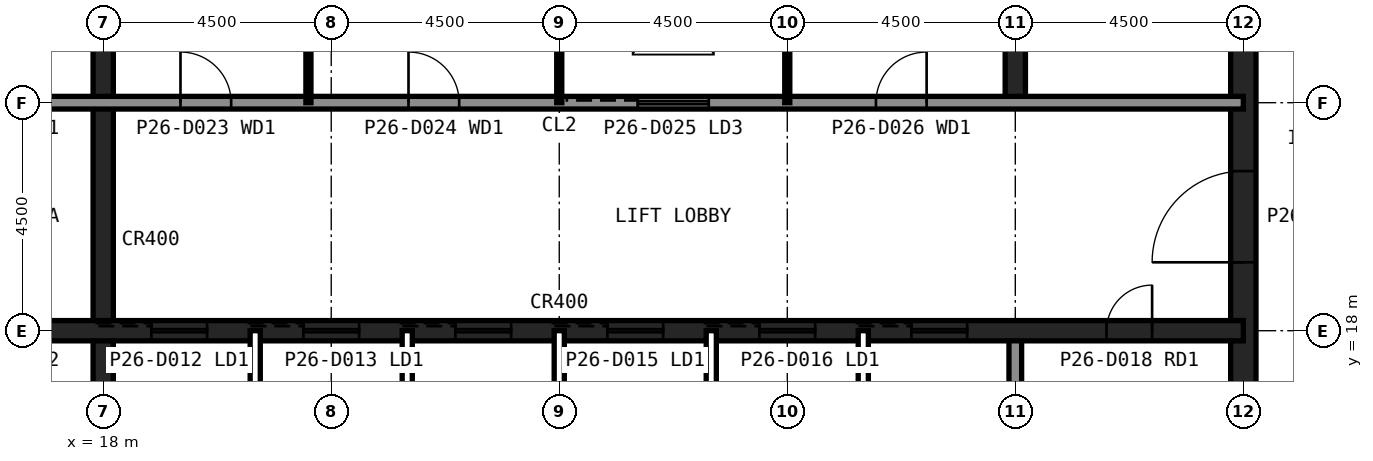
"""IFC4 building model, lengths in metres.
Left out: names, types, materials, properties, quantities, classifications, styles, units other than length and angle.
Written with IfcOpenShell. Run it as: python <this file> out.ifc"""

import sys

from ifc_helpers import new_model, si_unit, direction, frame, frame_2d, origin, place, context, subcontext, project, spatial, rectangle, extrude, element, fill, save


model = new_model("IFC4")
c1 = context("Model", 3, precision=1e-05, world=origin(), true_north=direction((0.0, 1.0)))
c2 = subcontext(c1, "Body", "Model", "MODEL_VIEW")
j1 = project(units=[si_unit("LENGTHUNIT", "METRE"), si_unit("PLANEANGLEUNIT", "RADIAN")], contexts=[c1])
p1 = place(None, origin())
s1 = spatial("IfcSite", under=j1, at=p1, CompositionType="ELEMENT")
p2 = place(p1, origin())
s2 = spatial("IfcBuilding", under=s1, at=p2, CompositionType="ELEMENT")
p3 = place(p2, frame((0.0, 0.0, 115.6)))
s3 = spatial("IfcBuildingStorey", under=s2, at=p3, CompositionType="ELEMENT", Elevation=115.6)
p4 = place(p3, frame((40.5, 13.5, 0.0), z_axis=(0.0, 0.0, 1.0), x_axis=(0.0, 1.0, 0.0)))
e1 = element("IfcWall", 1, at=p4, inside=s3, PredefinedType="SHEAR", context=c2, shape_type="SweptSolid", body=[
    extrude(rectangle(XDim=27.0, YDim=0.5, at=frame_2d((13.5, 0.0))), origin(), (0.0, 0.0, 1.0), 4.0),
])
p5 = place(p4, frame((5.85, 0.0, 0.0)))
e2 = element("IfcOpeningElement", 2, at=p5, cuts=e1, PredefinedType="OPENING", context=c2, shape_type="SweptSolid", body=[
    extrude(rectangle(XDim=1.8, YDim=2.1, at=frame_2d((0.9, 1.05))), frame((0.0, 0.26, 0.0), z_axis=(0.0, -1.0, 0.0), x_axis=(1.0, 0.0, 0.0)), (0.0, 0.0, 1.0), 0.52),
])
p6 = place(p4, frame((19.65, 0.0, 0.0)))
e3 = element("IfcOpeningElement", 3, at=p6, cuts=e1, PredefinedType="OPENING", context=c2, shape_type="SweptSolid", body=[
    extrude(rectangle(XDim=1.2, YDim=2.1, at=frame_2d((0.6, 1.05))), frame((0.0, 0.26, 0.0), z_axis=(0.0, -1.0, 0.0), x_axis=(1.0, 0.0, 0.0)), (0.0, 0.0, 1.0), 0.52),
])
p7 = place(p3, frame((18.0, 13.5, 0.0), z_axis=(0.0, 0.0, 1.0), x_axis=(0.0, 1.0, 0.0)))
e4 = element("IfcWall", 4, at=p7, inside=s3, PredefinedType="SHEAR", context=c2, shape_type="SweptSolid", body=[
    extrude(rectangle(XDim=18.0, YDim=0.4, at=frame_2d((9.0, 0.0))), origin(), (0.0, 0.0, 1.0), 4.0),
])
p8 = place(p3, frame((36.0, 13.5, 0.0), z_axis=(0.0, 0.0, 1.0), x_axis=(0.0, 1.0, 0.0)))
e5 = element("IfcWall", 5, at=p8, inside=s3, PredefinedType="SOLIDWALL", context=c2, shape_type="SweptSolid", body=[
    extrude(rectangle(XDim=4.5, YDim=0.25, at=frame_2d((2.25, 0.0))), origin(), (0.0, 0.0, 1.0), 3.84),
])
p9 = place(p3, frame((36.0, 22.5, 0.0), z_axis=(0.0, 0.0, 1.0), x_axis=(0.0, 1.0, 0.0)))
e6 = element("IfcWall", 6, at=p9, inside=s3, PredefinedType="SHEAR", context=c2, shape_type="SweptSolid", body=[
    extrude(rectangle(XDim=18.0, YDim=0.4, at=frame_2d((9.0, 0.0))), origin(), (0.0, 0.0, 1.0), 4.0),
])
p10 = place(p3, frame((13.5, 18.0, 0.0), z_axis=(0.0, 0.0, 1.0), x_axis=(1.0, 0.0, 0.0)))
e7 = element("IfcWall", 7, at=p10, inside=s3, PredefinedType="SHEAR", context=c2, shape_type="SweptSolid", body=[
    extrude(rectangle(XDim=27.0, YDim=0.4, at=frame_2d((13.5, 0.0))), origin(), (0.0, 0.0, 1.0), 4.0),
])
p11 = place(p10, frame((24.3, 0.0, 0.0)))
e8 = element("IfcOpeningElement", 8, at=p11, cuts=e7, PredefinedType="OPENING", context=c2, shape_type="SweptSolid", body=[
    extrude(rectangle(XDim=0.9, YDim=2.1, at=frame_2d((0.45, 1.05))), frame((0.0, 0.21, 0.0), z_axis=(0.0, -1.0, 0.0), x_axis=(1.0, 0.0, 0.0)), (0.0, 0.0, 1.0), 0.42),
])
p12 = place(p10, frame((5.45, 0.0, 0.0)))
e9 = element("IfcOpeningElement", 9, at=p12, cuts=e7, PredefinedType="OPENING", context=c2, shape_type="SweptSolid", body=[
    extrude(rectangle(XDim=1.1, YDim=2.1, at=frame_2d((0.55, 1.05))), frame((0.0, 0.21, 0.0), z_axis=(0.0, -1.0, 0.0), x_axis=(1.0, 0.0, 0.0)), (0.0, 0.0, 1.0), 0.42),
])
p13 = place(p10, frame((8.45, 0.0, 0.0)))
e10 = element("IfcOpeningElement", 10, at=p13, cuts=e7, PredefinedType="OPENING", context=c2, shape_type="SweptSolid", body=[
    extrude(rectangle(XDim=1.1, YDim=2.1, at=frame_2d((0.55, 1.05))), frame((0.0, 0.21, 0.0), z_axis=(0.0, -1.0, 0.0), x_axis=(1.0, 0.0, 0.0)), (0.0, 0.0, 1.0), 0.42),
])
p14 = place(p10, frame((11.45, 0.0, 0.0)))
e11 = element("IfcOpeningElement", 11, at=p14, cuts=e7, PredefinedType="OPENING", context=c2, shape_type="SweptSolid", body=[
    extrude(rectangle(XDim=1.1, YDim=2.1, at=frame_2d((0.55, 1.05))), frame((0.0, 0.21, 0.0), z_axis=(0.0, -1.0, 0.0), x_axis=(1.0, 0.0, 0.0)), (0.0, 0.0, 1.0), 0.42),
])
p15 = place(p10, frame((14.45, 0.0, 0.0)))
e12 = element("IfcOpeningElement", 12, at=p15, cuts=e7, PredefinedType="OPENING", context=c2, shape_type="SweptSolid", body=[
    extrude(rectangle(XDim=1.1, YDim=2.1, at=frame_2d((0.55, 1.05))), frame((0.0, 0.21, 0.0), z_axis=(0.0, -1.0, 0.0), x_axis=(1.0, 0.0, 0.0)), (0.0, 0.0, 1.0), 0.42),
])
p16 = place(p10, frame((17.45, 0.0, 0.0)))
e13 = element("IfcOpeningElement", 13, at=p16, cuts=e7, PredefinedType="OPENING", context=c2, shape_type="SweptSolid", body=[
    extrude(rectangle(XDim=1.1, YDim=2.1, at=frame_2d((0.55, 1.05))), frame((0.0, 0.21, 0.0), z_axis=(0.0, -1.0, 0.0), x_axis=(1.0, 0.0, 0.0)), (0.0, 0.0, 1.0), 0.42),
])
p17 = place(p10, frame((20.45, 0.0, 0.0)))
e14 = element("IfcOpeningElement", 14, at=p17, cuts=e7, PredefinedType="OPENING", context=c2, shape_type="SweptSolid", body=[
    extrude(rectangle(XDim=1.1, YDim=2.1, at=frame_2d((0.55, 1.05))), frame((0.0, 0.21, 0.0), z_axis=(0.0, -1.0, 0.0), x_axis=(1.0, 0.0, 0.0)), (0.0, 0.0, 1.0), 0.42),
])
p18 = place(p10, frame((1.6, 0.0, 0.0)))
e15 = element("IfcOpeningElement", 15, at=p18, cuts=e7, PredefinedType="OPENING", context=c2, shape_type="SweptSolid", body=[
    extrude(rectangle(XDim=1.3, YDim=2.2, at=frame_2d((0.65, 1.1))), frame((0.0, 0.21, 0.0), z_axis=(0.0, -1.0, 0.0), x_axis=(1.0, 0.0, 0.0)), (0.0, 0.0, 1.0), 0.42),
])
p19 = place(p3, frame((13.5, 22.5, 0.0), z_axis=(0.0, 0.0, 1.0), x_axis=(1.0, 0.0, 0.0)))
e16 = element("IfcWall", 16, at=p19, inside=s3, PredefinedType="SOLIDWALL", context=c2, shape_type="SweptSolid", body=[
    extrude(rectangle(XDim=27.0, YDim=0.25, at=frame_2d((13.5, 0.0))), origin(), (0.0, 0.0, 1.0), 3.84),
])
p20 = place(p19, frame((1.65, 0.0, 0.0)))
e17 = element("IfcOpeningElement", 17, at=p20, cuts=e16, PredefinedType="OPENING", context=c2, shape_type="SweptSolid", body=[
    extrude(rectangle(XDim=1.2, YDim=2.1, at=frame_2d((0.6, 1.05))), frame((0.0, 0.135, 0.0), z_axis=(0.0, -1.0, 0.0), x_axis=(1.0, 0.0, 0.0)), (0.0, 0.0, 1.0), 0.27),
])
p21 = place(p19, frame((6.025, 0.0, 0.0)))
e18 = element("IfcOpeningElement", 18, at=p21, cuts=e16, PredefinedType="OPENING", context=c2, shape_type="SweptSolid", body=[
    extrude(rectangle(XDim=1.0, YDim=2.1, at=frame_2d((0.5, 1.05))), frame((0.0, 0.135, 0.0), z_axis=(0.0, -1.0, 0.0), x_axis=(1.0, 0.0, 0.0)), (0.0, 0.0, 1.0), 0.27),
])
p22 = place(p19, frame((10.525, 0.0, 0.0)))
e19 = element("IfcOpeningElement", 19, at=p22, cuts=e16, PredefinedType="OPENING", context=c2, shape_type="SweptSolid", body=[
    extrude(rectangle(XDim=1.0, YDim=2.1, at=frame_2d((0.5, 1.05))), frame((0.0, 0.135, 0.0), z_axis=(0.0, -1.0, 0.0), x_axis=(1.0, 0.0, 0.0)), (0.0, 0.0, 1.0), 0.27),
])
p23 = place(p19, frame((19.75, 0.0, 0.0)))
e20 = element("IfcOpeningElement", 20, at=p23, cuts=e16, PredefinedType="OPENING", context=c2, shape_type="SweptSolid", body=[
    extrude(rectangle(XDim=1.0, YDim=2.1, at=frame_2d((0.5, 1.05))), frame((0.0, 0.135, 0.0), z_axis=(0.0, -1.0, 0.0), x_axis=(1.0, 0.0, 0.0)), (0.0, 0.0, 1.0), 0.27),
])
p24 = place(p19, frame((15.05, 0.0, 0.0)))
e21 = element("IfcOpeningElement", 21, at=p24, cuts=e16, PredefinedType="OPENING", context=c2, shape_type="SweptSolid", body=[
    extrude(rectangle(XDim=1.4, YDim=2.4, at=frame_2d((0.7, 1.2))), frame((0.0, 0.135, 0.0), z_axis=(0.0, -1.0, 0.0), x_axis=(1.0, 0.0, 0.0)), (0.0, 0.0, 1.0), 0.27),
])
for number, where, z_axis, x_axis in (
    (22, (21.0, 13.5, 0.0), (0.0, 0.0, 1.0), (0.0, 1.0, 0.0)),
    (23, (24.0, 13.5, 0.0), (0.0, 0.0, 1.0), (0.0, 1.0, 0.0)),
    (24, (27.0, 13.5, 0.0), (0.0, 0.0, 1.0), (0.0, 1.0, 0.0)),
    (25, (30.0, 13.5, 0.0), (0.0, 0.0, 1.0), (0.0, 1.0, 0.0)),
    (26, (33.0, 13.5, 0.0), (0.0, 0.0, 1.0), (0.0, 1.0, 0.0)),
):
    element("IfcWall", number, at=place(p3, frame(where, z_axis=z_axis, x_axis=x_axis)), inside=s3, PredefinedType="PARTITIONING", context=c2, shape_type="SweptSolid", body=[
        extrude(rectangle(XDim=4.5, YDim=0.2, at=frame_2d((2.25, 0.0))), origin(), (0.0, 0.0, 1.0), 3.84),
    ])
for number, where, z_axis, x_axis in (
    (27, (22.05, 22.5, 0.0), (0.0, 0.0, 1.0), (0.0, 1.0, 0.0)),
    (28, (27.0, 22.5, 0.0), (0.0, 0.0, 1.0), (0.0, 1.0, 0.0)),
    (29, (31.5, 22.5, 0.0), (0.0, 0.0, 1.0), (0.0, 1.0, 0.0)),
):
    element("IfcWall", number, at=place(p3, frame(where, z_axis=z_axis, x_axis=x_axis)), inside=s3, PredefinedType="PLUMBINGWALL", context=c2, shape_type="SweptSolid", body=[
        extrude(rectangle(XDim=9.0, YDim=0.1, at=frame_2d((4.5, 0.0))), origin(), (0.0, 0.0, 1.0), 3.84),
    ])
p25 = place(p5, origin())
e30 = element("IfcDoor", 30, at=p25, inside=s3, OperationType="SINGLE_SWING_LEFT", PredefinedType="DOOR", context=c2, shape_type="SweptSolid", body=[
    extrude(rectangle(XDim=1.8, YDim=2.1, at=frame_2d((0.9, 1.05))), frame((0.0, 0.025, 0.0), z_axis=(0.0, -1.0, 0.0), x_axis=(1.0, 0.0, 0.0)), (0.0, 0.0, 1.0), 0.05),
])
fill(e2, e30)
p26 = place(p21, origin())
e31 = element("IfcDoor", 31, at=p26, inside=s3, OperationType="SINGLE_SWING_LEFT", PredefinedType="DOOR", context=c2, shape_type="SweptSolid", body=[
    extrude(rectangle(XDim=1.0, YDim=2.1, at=frame_2d((0.5, 1.05))), frame((0.0, 0.025, 0.0), z_axis=(0.0, -1.0, 0.0), x_axis=(1.0, 0.0, 0.0)), (0.0, 0.0, 1.0), 0.05),
])
fill(e18, e31)
p27 = place(p22, origin())
e32 = element("IfcDoor", 32, at=p27, inside=s3, OperationType="SINGLE_SWING_LEFT", PredefinedType="DOOR", context=c2, shape_type="SweptSolid", body=[
    extrude(rectangle(XDim=1.0, YDim=2.1, at=frame_2d((0.5, 1.05))), frame((0.0, 0.025, 0.0), z_axis=(0.0, -1.0, 0.0), x_axis=(1.0, 0.0, 0.0)), (0.0, 0.0, 1.0), 0.05),
])
fill(e19, e32)
p28 = place(p23, origin())
e33 = element("IfcDoor", 33, at=p28, inside=s3, OperationType="SINGLE_SWING_RIGHT", PredefinedType="DOOR", context=c2, shape_type="SweptSolid", body=[
    extrude(rectangle(XDim=1.0, YDim=2.1, at=frame_2d((0.5, 1.05))), frame((0.0, 0.025, 0.0), z_axis=(0.0, -1.0, 0.0), x_axis=(1.0, 0.0, 0.0)), (0.0, 0.0, 1.0), 0.05),
])
fill(e20, e33)
p29 = place(p11, origin())
e34 = element("IfcDoor", 34, at=p29, inside=s3, OperationType="SINGLE_SWING_RIGHT", PredefinedType="DOOR", context=c2, shape_type="SweptSolid", body=[
    extrude(rectangle(XDim=0.9, YDim=2.1, at=frame_2d((0.45, 1.05))), frame((0.0, 0.025, 0.0), z_axis=(0.0, -1.0, 0.0), x_axis=(1.0, 0.0, 0.0)), (0.0, 0.0, 1.0), 0.05),
])
fill(e8, e34)
p30 = place(p12, origin())
e35 = element("IfcDoor", 35, at=p30, inside=s3, OperationType="SLIDING_TO_LEFT", PredefinedType="DOOR", context=c2, shape_type="SweptSolid", body=[
    extrude(rectangle(XDim=1.1, YDim=2.1, at=frame_2d((0.55, 1.05))), frame((0.0, 0.025, 0.0), z_axis=(0.0, -1.0, 0.0), x_axis=(1.0, 0.0, 0.0)), (0.0, 0.0, 1.0), 0.05),
])
fill(e9, e35)
p31 = place(p13, origin())
e36 = element("IfcDoor", 36, at=p31, inside=s3, OperationType="SLIDING_TO_LEFT", PredefinedType="DOOR", context=c2, shape_type="SweptSolid", body=[
    extrude(rectangle(XDim=1.1, YDim=2.1, at=frame_2d((0.55, 1.05))), frame((0.0, 0.025, 0.0), z_axis=(0.0, -1.0, 0.0), x_axis=(1.0, 0.0, 0.0)), (0.0, 0.0, 1.0), 0.05),
])
fill(e10, e36)
p32 = place(p14, origin())
e37 = element("IfcDoor", 37, at=p32, inside=s3, OperationType="SLIDING_TO_LEFT", PredefinedType="DOOR", context=c2, shape_type="SweptSolid", body=[
    extrude(rectangle(XDim=1.1, YDim=2.1, at=frame_2d((0.55, 1.05))), frame((0.0, 0.025, 0.0), z_axis=(0.0, -1.0, 0.0), x_axis=(1.0, 0.0, 0.0)), (0.0, 0.0, 1.0), 0.05),
])
fill(e11, e37)
p33 = place(p15, origin())
e38 = element("IfcDoor", 38, at=p33, inside=s3, OperationType="SLIDING_TO_LEFT", PredefinedType="DOOR", context=c2, shape_type="SweptSolid", body=[
    extrude(rectangle(XDim=1.1, YDim=2.1, at=frame_2d((0.55, 1.05))), frame((0.0, 0.025, 0.0), z_axis=(0.0, -1.0, 0.0), x_axis=(1.0, 0.0, 0.0)), (0.0, 0.0, 1.0), 0.05),
])
fill(e12, e38)
p34 = place(p16, origin())
e39 = element("IfcDoor", 39, at=p34, inside=s3, OperationType="SLIDING_TO_LEFT", PredefinedType="DOOR", context=c2, shape_type="SweptSolid", body=[
    extrude(rectangle(XDim=1.1, YDim=2.1, at=frame_2d((0.55, 1.05))), frame((0.0, 0.025, 0.0), z_axis=(0.0, -1.0, 0.0), x_axis=(1.0, 0.0, 0.0)), (0.0, 0.0, 1.0), 0.05),
])
fill(e13, e39)
p35 = place(p17, origin())
e40 = element("IfcDoor", 40, at=p35, inside=s3, OperationType="SLIDING_TO_LEFT", PredefinedType="DOOR", context=c2, shape_type="SweptSolid", body=[
    extrude(rectangle(XDim=1.1, YDim=2.1, at=frame_2d((0.55, 1.05))), frame((0.0, 0.025, 0.0), z_axis=(0.0, -1.0, 0.0), x_axis=(1.0, 0.0, 0.0)), (0.0, 0.0, 1.0), 0.05),
])
fill(e14, e40)
p36 = place(p24, origin())
e41 = element("IfcDoor", 41, at=p36, inside=s3, OperationType="SLIDING_TO_LEFT", PredefinedType="DOOR", context=c2, shape_type="SweptSolid", body=[
    extrude(rectangle(XDim=1.4, YDim=2.4, at=frame_2d((0.7, 1.2))), frame((0.0, 0.025, 0.0), z_axis=(0.0, -1.0, 0.0), x_axis=(1.0, 0.0, 0.0)), (0.0, 0.0, 1.0), 0.05),
])
fill(e21, e41)
save(model, sys.argv[1])
